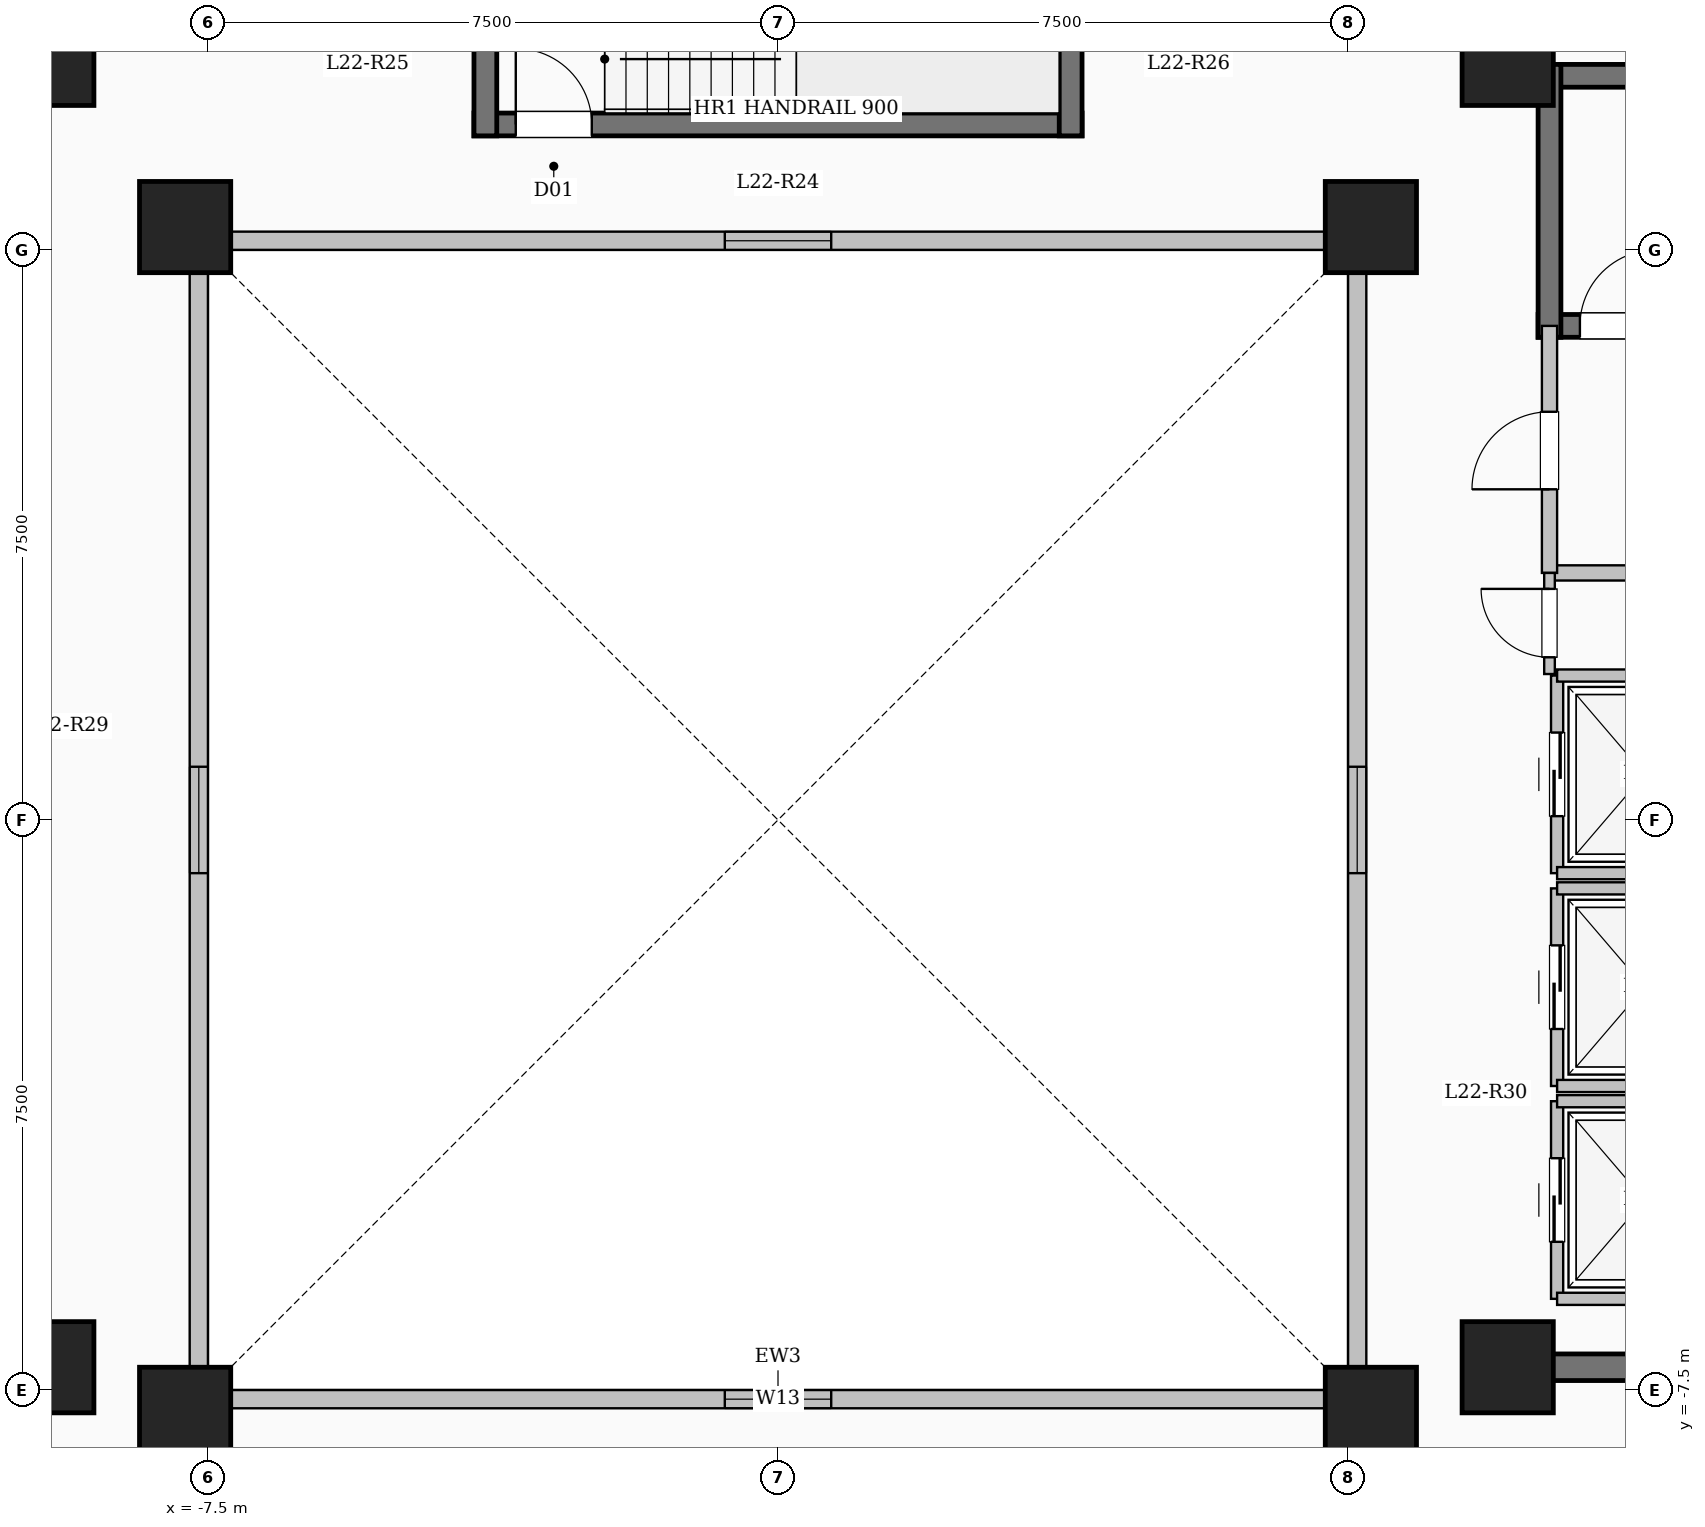
"""IFC4 building model, lengths in metres.
Left out: names, types, materials, properties, quantities, classifications, styles, units other than length and angle.
Written with IfcOpenShell. Run it as: python <this file> out.ifc"""

import sys

from ifc_helpers import new_model, si_unit, direction, frame, frame_2d, origin, origin_2d, place, context, subcontext, project, spatial, rectangle, extrude, element, fill, save


model = new_model("IFC4")
c1 = context("Model", 3, precision=1e-05, world=origin(), true_north=direction((0.0, 1.0)))
c2 = subcontext(c1, "Body", "Model", "MODEL_VIEW")
j1 = project(units=[si_unit("LENGTHUNIT", "METRE"), si_unit("PLANEANGLEUNIT", "RADIAN")], contexts=[c1])
p1 = place(None, origin())
s1 = spatial("IfcSite", under=j1, at=p1, CompositionType="ELEMENT")
p2 = place(p1, origin())
s2 = spatial("IfcBuilding", under=s1, at=p2, CompositionType="ELEMENT")
p3 = place(p2, frame((0.0, 0.0, 85.0)))
s3 = spatial("IfcBuildingStorey", under=s2, at=p3, CompositionType="ELEMENT", Elevation=85.0)
for number, where, z_axis, x_axis in (
    (1, (-7.8, -7.8, 0.0), (0.0, 0.0, 1.0), (1.0, 0.0, 0.0)),
    (2, (7.8, -7.8, 0.0), (0.0, 0.0, 1.0), (1.0, 0.0, 0.0)),
    (3, (-7.8, 7.8, 0.0), (0.0, 0.0, 1.0), (1.0, 0.0, 0.0)),
    (4, (7.8, 7.8, 0.0), (0.0, 0.0, 1.0), (1.0, 0.0, 0.0)),
    (5, (-9.6, -7.2, 0.0), (0.0, 0.0, 1.0), (1.0, 0.0, 0.0)),
    (6, (-9.6, 10.0, 0.0), (0.0, 0.0, 1.0), (1.0, 0.0, 0.0)),
    (7, (9.6, -7.2, 0.0), (0.0, 0.0, 1.0), (1.0, 0.0, 0.0)),
    (8, (9.6, 10.0, 0.0), (0.0, 0.0, 1.0), (1.0, 0.0, 0.0)),
):
    element("IfcColumn", number, at=place(p3, frame(where, z_axis=z_axis, x_axis=x_axis)), inside=s3, PredefinedType="COLUMN", context=c2, shape_type="SweptSolid", body=[
        extrude(rectangle(XDim=1.2, YDim=1.2, at=origin_2d()), origin(), (0.0, 0.0, 1.0), 3.35),
    ])
p4 = place(p3, frame((-7.62, -7.62, 0.0), z_axis=(0.0, 0.0, 1.0), x_axis=(1.0, 0.0, 0.0)))
e9 = element("IfcWall", 9, at=p4, inside=s3, PredefinedType="SOLIDWALL", context=c2, shape_type="SweptSolid", body=[
    extrude(rectangle(XDim=15.24, YDim=0.24, at=frame_2d((7.62, 0.0))), origin(), (0.0, 0.0, 1.0), 3.1),
])
p5 = place(p4, frame((6.92, 0.0, 0.95)))
e10 = element("IfcOpeningElement", 10, at=p5, cuts=e9, PredefinedType="OPENING", context=c2, shape_type="SweptSolid", body=[
    extrude(rectangle(XDim=1.4, YDim=1.5, at=frame_2d((0.7, 0.75))), frame((0.0, 0.13, 0.0), z_axis=(0.0, -1.0, 0.0), x_axis=(1.0, 0.0, 0.0)), (0.0, 0.0, 1.0), 0.26),
])
p6 = place(p3, frame((7.62, -7.62, 0.0), z_axis=(0.0, 0.0, 1.0), x_axis=(0.0, 1.0, 0.0)))
e11 = element("IfcWall", 11, at=p6, inside=s3, PredefinedType="SOLIDWALL", context=c2, shape_type="SweptSolid", body=[
    extrude(rectangle(XDim=15.24, YDim=0.24, at=frame_2d((7.62, 0.0))), origin(), (0.0, 0.0, 1.0), 3.1),
])
p7 = place(p6, frame((6.92, 0.0, 0.95)))
e12 = element("IfcOpeningElement", 12, at=p7, cuts=e11, PredefinedType="OPENING", context=c2, shape_type="SweptSolid", body=[
    extrude(rectangle(XDim=1.4, YDim=1.5, at=frame_2d((0.7, 0.75))), frame((0.0, 0.13, 0.0), z_axis=(0.0, -1.0, 0.0), x_axis=(1.0, 0.0, 0.0)), (0.0, 0.0, 1.0), 0.26),
])
p8 = place(p3, frame((7.62, 7.62, 0.0), z_axis=(0.0, 0.0, 1.0), x_axis=(-1.0, 0.0, 0.0)))
e13 = element("IfcWall", 13, at=p8, inside=s3, PredefinedType="SOLIDWALL", context=c2, shape_type="SweptSolid", body=[
    extrude(rectangle(XDim=15.24, YDim=0.24, at=frame_2d((7.62, 0.0))), origin(), (0.0, 0.0, 1.0), 3.1),
])
p9 = place(p8, frame((6.92, 0.0, 0.95)))
e14 = element("IfcOpeningElement", 14, at=p9, cuts=e13, PredefinedType="OPENING", context=c2, shape_type="SweptSolid", body=[
    extrude(rectangle(XDim=1.4, YDim=1.5, at=frame_2d((0.7, 0.75))), frame((0.0, 0.13, 0.0), z_axis=(0.0, -1.0, 0.0), x_axis=(1.0, 0.0, 0.0)), (0.0, 0.0, 1.0), 0.26),
])
p10 = place(p3, frame((-7.62, 7.62, 0.0), z_axis=(0.0, 0.0, 1.0), x_axis=(0.0, -1.0, 0.0)))
e15 = element("IfcWall", 15, at=p10, inside=s3, PredefinedType="SOLIDWALL", context=c2, shape_type="SweptSolid", body=[
    extrude(rectangle(XDim=15.24, YDim=0.24, at=frame_2d((7.62, 0.0))), origin(), (0.0, 0.0, 1.0), 3.1),
])
p11 = place(p10, frame((6.92, 0.0, 0.95)))
e16 = element("IfcOpeningElement", 16, at=p11, cuts=e15, PredefinedType="OPENING", context=c2, shape_type="SweptSolid", body=[
    extrude(rectangle(XDim=1.4, YDim=1.5, at=frame_2d((0.7, 0.75))), frame((0.0, 0.13, 0.0), z_axis=(0.0, -1.0, 0.0), x_axis=(1.0, 0.0, 0.0)), (0.0, 0.0, 1.0), 0.26),
])
p12 = place(p3, frame((10.0, 9.79, 0.0), z_axis=(0.0, 0.0, 1.0), x_axis=(1.0, 0.0, 0.0)))
e17 = element("IfcWall", 17, at=p12, inside=s3, PredefinedType="SHEAR", context=c2, shape_type="SweptSolid", body=[
    extrude(rectangle(XDim=8.0, YDim=0.3, at=frame_2d((4.0, 0.0))), origin(), (0.0, 0.0, 1.0), 3.35),
])
p13 = place(p3, frame((10.0, 6.5, 0.0), z_axis=(0.0, 0.0, 1.0), x_axis=(1.0, 0.0, 0.0)))
e18 = element("IfcWall", 18, at=p13, inside=s3, PredefinedType="SHEAR", context=c2, shape_type="SweptSolid", body=[
    extrude(rectangle(XDim=8.0, YDim=0.3, at=frame_2d((4.0, 0.0))), origin(), (0.0, 0.0, 1.0), 3.35),
])
p14 = place(p13, frame((0.55, 0.0, 0.0)))
e19 = element("IfcOpeningElement", 19, at=p14, cuts=e18, PredefinedType="OPENING", context=c2, shape_type="SweptSolid", body=[
    extrude(rectangle(XDim=1.0, YDim=2.15, at=frame_2d((0.5, 1.075))), frame((0.0, 0.16, 0.0), z_axis=(0.0, -1.0, 0.0), x_axis=(1.0, 0.0, 0.0)), (0.0, 0.0, 1.0), 0.32),
])
p15 = place(p3, frame((10.15, 6.35, 0.0), z_axis=(0.0, 0.0, 1.0), x_axis=(0.0, 1.0, 0.0)))
e20 = element("IfcWall", 20, at=p15, inside=s3, PredefinedType="SHEAR", context=c2, shape_type="SweptSolid", body=[
    extrude(rectangle(XDim=3.59, YDim=0.3, at=frame_2d((1.795, 0.0))), origin(), (0.0, 0.0, 1.0), 3.35),
])
p16 = place(p3, frame((-4.0, 9.15, 0.0), z_axis=(0.0, 0.0, 1.0), x_axis=(1.0, 0.0, 0.0)))
e21 = element("IfcWall", 21, at=p16, inside=s3, PredefinedType="SHEAR", context=c2, shape_type="SweptSolid", body=[
    extrude(rectangle(XDim=8.0, YDim=0.3, at=frame_2d((4.0, 0.0))), origin(), (0.0, 0.0, 1.0), 3.35),
])
p17 = place(p16, frame((0.55, 0.0, 0.0)))
e22 = element("IfcOpeningElement", 22, at=p17, cuts=e21, PredefinedType="OPENING", context=c2, shape_type="SweptSolid", body=[
    extrude(rectangle(XDim=1.0, YDim=2.15, at=frame_2d((0.5, 1.075))), frame((0.0, 0.16, 0.0), z_axis=(0.0, -1.0, 0.0), x_axis=(1.0, 0.0, 0.0)), (0.0, 0.0, 1.0), 0.32),
])
for number, where, z_axis, x_axis in (
    (23, (-3.85, 9.0, 0.0), (0.0, 0.0, 1.0), (0.0, 1.0, 0.0)),
    (24, (3.85, 9.0, 0.0), (0.0, 0.0, 1.0), (0.0, 1.0, 0.0)),
):
    element("IfcWall", number, at=place(p3, frame(where, z_axis=z_axis, x_axis=x_axis)), inside=s3, PredefinedType="SHEAR", context=c2, shape_type="SweptSolid", body=[
        extrude(rectangle(XDim=3.59, YDim=0.3, at=frame_2d((1.795, 0.0))), origin(), (0.0, 0.0, 1.0), 3.35),
    ])
p18 = place(p3, frame((10.15, 3.25, 0.0), z_axis=(0.0, 0.0, 1.0), x_axis=(1.0, 0.0, 0.0)))
e25 = element("IfcWall", 25, at=p18, inside=s3, PredefinedType="SOLIDWALL", context=c2, shape_type="SweptSolid", body=[
    extrude(rectangle(XDim=5.4, YDim=0.2, at=frame_2d((2.7, 0.0))), origin(), (0.0, 0.0, 1.0), 3.1),
])
p19 = place(p3, frame((10.15, 3.25, 0.0), z_axis=(0.0, 0.0, 1.0), x_axis=(0.0, 1.0, 0.0)))
e26 = element("IfcWall", 26, at=p19, inside=s3, PredefinedType="SOLIDWALL", context=c2, shape_type="SweptSolid", body=[
    extrude(rectangle(XDim=3.25, YDim=0.2, at=frame_2d((1.625, 0.0))), origin(), (0.0, 0.0, 1.0), 3.1),
])
p20 = place(p19, frame((1.1, 0.0, 0.0)))
e27 = element("IfcOpeningElement", 27, at=p20, cuts=e26, PredefinedType="OPENING", context=c2, shape_type="SweptSolid", body=[
    extrude(rectangle(XDim=1.02, YDim=2.15, at=frame_2d((0.51, 1.075))), frame((0.0, 0.11, 0.0), z_axis=(0.0, -1.0, 0.0), x_axis=(1.0, 0.0, 0.0)), (0.0, 0.0, 1.0), 0.22),
])
p21 = place(p3, frame((10.25, -6.3, 0.0), z_axis=(0.0, 0.0, 1.0), x_axis=(0.0, 1.0, 0.0)))
e28 = element("IfcWall", 28, at=p21, inside=s3, PredefinedType="SOLIDWALL", context=c2, shape_type="SweptSolid", body=[
    extrude(rectangle(XDim=2.6, YDim=0.16, at=frame_2d((1.3, 0.0))), origin(), (0.0, 0.0, 1.0), 3.1),
])
p22 = place(p21, frame((0.75, 0.0, 0.0)))
e29 = element("IfcOpeningElement", 29, at=p22, cuts=e28, PredefinedType="OPENING", context=c2, shape_type="SweptSolid", body=[
    extrude(rectangle(XDim=1.1, YDim=2.15, at=frame_2d((0.55, 1.075))), frame((0.0, 0.09, 0.0), z_axis=(0.0, -1.0, 0.0), x_axis=(1.0, 0.0, 0.0)), (0.0, 0.0, 1.0), 0.18),
])
for number, where, z_axis, x_axis in (
    (30, (10.25, -6.3, 0.0), (0.0, 0.0, 1.0), (1.0, 0.0, 0.0)),
    (31, (10.25, -3.7, 0.0), (0.0, 0.0, 1.0), (1.0, 0.0, 0.0)),
):
    element("IfcWall", number, at=place(p3, frame(where, z_axis=z_axis, x_axis=x_axis)), inside=s3, PredefinedType="SOLIDWALL", context=c2, shape_type="SweptSolid", body=[
        extrude(rectangle(XDim=2.3, YDim=0.16, at=frame_2d((1.15, 0.0))), origin(), (0.0, 0.0, 1.0), 3.1),
    ])
p23 = place(p3, frame((10.25, -3.5, 0.0), z_axis=(0.0, 0.0, 1.0), x_axis=(0.0, 1.0, 0.0)))
e32 = element("IfcWall", 32, at=p23, inside=s3, PredefinedType="SOLIDWALL", context=c2, shape_type="SweptSolid", body=[
    extrude(rectangle(XDim=2.6, YDim=0.16, at=frame_2d((1.3, 0.0))), origin(), (0.0, 0.0, 1.0), 3.1),
])
p24 = place(p23, frame((0.75, 0.0, 0.0)))
e33 = element("IfcOpeningElement", 33, at=p24, cuts=e32, PredefinedType="OPENING", context=c2, shape_type="SweptSolid", body=[
    extrude(rectangle(XDim=1.1, YDim=2.15, at=frame_2d((0.55, 1.075))), frame((0.0, 0.09, 0.0), z_axis=(0.0, -1.0, 0.0), x_axis=(1.0, 0.0, 0.0)), (0.0, 0.0, 1.0), 0.18),
])
for number, where, z_axis, x_axis in (
    (34, (10.25, -3.5, 0.0), (0.0, 0.0, 1.0), (1.0, 0.0, 0.0)),
    (35, (10.25, -0.9, 0.0), (0.0, 0.0, 1.0), (1.0, 0.0, 0.0)),
):
    element("IfcWall", number, at=place(p3, frame(where, z_axis=z_axis, x_axis=x_axis)), inside=s3, PredefinedType="SOLIDWALL", context=c2, shape_type="SweptSolid", body=[
        extrude(rectangle(XDim=2.3, YDim=0.16, at=frame_2d((1.15, 0.0))), origin(), (0.0, 0.0, 1.0), 3.1),
    ])
p25 = place(p3, frame((10.25, -0.7, 0.0), z_axis=(0.0, 0.0, 1.0), x_axis=(0.0, 1.0, 0.0)))
e36 = element("IfcWall", 36, at=p25, inside=s3, PredefinedType="SOLIDWALL", context=c2, shape_type="SweptSolid", body=[
    extrude(rectangle(XDim=2.6, YDim=0.16, at=frame_2d((1.3, 0.0))), origin(), (0.0, 0.0, 1.0), 3.1),
])
p26 = place(p25, frame((0.75, 0.0, 0.0)))
e37 = element("IfcOpeningElement", 37, at=p26, cuts=e36, PredefinedType="OPENING", context=c2, shape_type="SweptSolid", body=[
    extrude(rectangle(XDim=1.1, YDim=2.15, at=frame_2d((0.55, 1.075))), frame((0.0, 0.09, 0.0), z_axis=(0.0, -1.0, 0.0), x_axis=(1.0, 0.0, 0.0)), (0.0, 0.0, 1.0), 0.18),
])
for number, where, z_axis, x_axis in (
    (38, (10.25, -0.7, 0.0), (0.0, 0.0, 1.0), (1.0, 0.0, 0.0)),
    (39, (10.25, 1.9, 0.0), (0.0, 0.0, 1.0), (1.0, 0.0, 0.0)),
):
    element("IfcWall", number, at=place(p3, frame(where, z_axis=z_axis, x_axis=x_axis)), inside=s3, PredefinedType="SOLIDWALL", context=c2, shape_type="SweptSolid", body=[
        extrude(rectangle(XDim=2.3, YDim=0.16, at=frame_2d((1.15, 0.0))), origin(), (0.0, 0.0, 1.0), 3.1),
    ])
p27 = place(p3, frame((10.075, -7.2, 0.0), z_axis=(0.0, 0.0, 1.0), x_axis=(1.0, 0.0, 0.0)))
e40 = element("IfcWall", 40, at=p27, inside=s3, PredefinedType="SHEAR", context=c2, shape_type="SweptSolid", body=[
    extrude(rectangle(XDim=8.55, YDim=0.35, at=frame_2d((4.275, 0.0))), origin(), (0.0, 0.0, 1.0), 3.35),
])
p28 = place(p3, frame((10.15, 1.92, 0.0), z_axis=(0.0, 0.0, 1.0), x_axis=(0.0, 1.0, 0.0)))
e41 = element("IfcWall", 41, at=p28, inside=s3, PredefinedType="PARTITIONING", context=c2, shape_type="SweptSolid", body=[
    extrude(rectangle(XDim=1.33, YDim=0.14, at=frame_2d((0.665, 0.0))), origin(), (0.0, 0.0, 1.0), 3.1),
])
p29 = place(p28, frame((0.22, 0.0, 0.0)))
e42 = element("IfcOpeningElement", 42, at=p29, cuts=e41, PredefinedType="OPENING", context=c2, shape_type="SweptSolid", body=[
    extrude(rectangle(XDim=0.9, YDim=2.08, at=frame_2d((0.45, 1.04))), frame((0.0, 0.08, 0.0), z_axis=(0.0, -1.0, 0.0), x_axis=(1.0, 0.0, 0.0)), (0.0, 0.0, 1.0), 0.16),
])
p30 = place(p5, origin())
e43 = element("IfcWindow", 43, at=p30, inside=s3, PartitioningType="SINGLE_PANEL", PredefinedType="WINDOW", context=c2, shape_type="SweptSolid", body=[
    extrude(rectangle(XDim=1.4, YDim=1.5, at=frame_2d((0.7, 0.75))), frame((0.0, 0.03, 0.0), z_axis=(0.0, -1.0, 0.0), x_axis=(1.0, 0.0, 0.0)), (0.0, 0.0, 1.0), 0.06),
])
fill(e10, e43)
p31 = place(p7, origin())
e44 = element("IfcWindow", 44, at=p31, inside=s3, PartitioningType="SINGLE_PANEL", PredefinedType="WINDOW", context=c2, shape_type="SweptSolid", body=[
    extrude(rectangle(XDim=1.4, YDim=1.5, at=frame_2d((0.7, 0.75))), frame((0.0, 0.03, 0.0), z_axis=(0.0, -1.0, 0.0), x_axis=(1.0, 0.0, 0.0)), (0.0, 0.0, 1.0), 0.06),
])
fill(e12, e44)
p32 = place(p9, origin())
e45 = element("IfcWindow", 45, at=p32, inside=s3, PartitioningType="SINGLE_PANEL", PredefinedType="WINDOW", context=c2, shape_type="SweptSolid", body=[
    extrude(rectangle(XDim=1.4, YDim=1.5, at=frame_2d((0.7, 0.75))), frame((0.0, 0.03, 0.0), z_axis=(0.0, -1.0, 0.0), x_axis=(1.0, 0.0, 0.0)), (0.0, 0.0, 1.0), 0.06),
])
fill(e14, e45)
p33 = place(p11, origin())
e46 = element("IfcWindow", 46, at=p33, inside=s3, PartitioningType="SINGLE_PANEL", PredefinedType="WINDOW", context=c2, shape_type="SweptSolid", body=[
    extrude(rectangle(XDim=1.4, YDim=1.5, at=frame_2d((0.7, 0.75))), frame((0.0, 0.03, 0.0), z_axis=(0.0, -1.0, 0.0), x_axis=(1.0, 0.0, 0.0)), (0.0, 0.0, 1.0), 0.06),
])
fill(e16, e46)
p34 = place(p14, origin())
e47 = element("IfcDoor", 47, at=p34, inside=s3, OperationType="SINGLE_SWING_RIGHT", PredefinedType="DOOR", context=c2, shape_type="SweptSolid", body=[
    extrude(rectangle(XDim=1.0, YDim=2.15, at=frame_2d((0.5, 1.075))), frame((0.0, 0.025, 0.0), z_axis=(0.0, -1.0, 0.0), x_axis=(1.0, 0.0, 0.0)), (0.0, 0.0, 1.0), 0.05),
])
fill(e19, e47)
p35 = place(p17, origin())
e48 = element("IfcDoor", 48, at=p35, inside=s3, OperationType="SINGLE_SWING_LEFT", PredefinedType="DOOR", context=c2, shape_type="SweptSolid", body=[
    extrude(rectangle(XDim=1.0, YDim=2.15, at=frame_2d((0.5, 1.075))), frame((0.0, 0.025, 0.0), z_axis=(0.0, -1.0, 0.0), x_axis=(1.0, 0.0, 0.0)), (0.0, 0.0, 1.0), 0.05),
])
fill(e22, e48)
p36 = place(p20, origin())
e49 = element("IfcDoor", 49, at=p36, inside=s3, OperationType="SINGLE_SWING_LEFT", PredefinedType="DOOR", context=c2, shape_type="SweptSolid", body=[
    extrude(rectangle(XDim=1.02, YDim=2.15, at=frame_2d((0.51, 1.075))), frame((0.0, 0.025, 0.0), z_axis=(0.0, -1.0, 0.0), x_axis=(1.0, 0.0, 0.0)), (0.0, 0.0, 1.0), 0.05),
])
fill(e27, e49)
p37 = place(p22, origin())
e50 = element("IfcDoor", 50, at=p37, inside=s3, OperationType="SLIDING_TO_LEFT", PredefinedType="DOOR", context=c2, shape_type="SweptSolid", body=[
    extrude(rectangle(XDim=1.1, YDim=2.15, at=frame_2d((0.55, 1.075))), frame((0.0, 0.025, 0.0), z_axis=(0.0, -1.0, 0.0), x_axis=(1.0, 0.0, 0.0)), (0.0, 0.0, 1.0), 0.05),
])
fill(e29, e50)
p38 = place(p24, origin())
e51 = element("IfcDoor", 51, at=p38, inside=s3, OperationType="SLIDING_TO_LEFT", PredefinedType="DOOR", context=c2, shape_type="SweptSolid", body=[
    extrude(rectangle(XDim=1.1, YDim=2.15, at=frame_2d((0.55, 1.075))), frame((0.0, 0.025, 0.0), z_axis=(0.0, -1.0, 0.0), x_axis=(1.0, 0.0, 0.0)), (0.0, 0.0, 1.0), 0.05),
])
fill(e33, e51)
p39 = place(p26, origin())
e52 = element("IfcDoor", 52, at=p39, inside=s3, OperationType="SLIDING_TO_LEFT", PredefinedType="DOOR", context=c2, shape_type="SweptSolid", body=[
    extrude(rectangle(XDim=1.1, YDim=2.15, at=frame_2d((0.55, 1.075))), frame((0.0, 0.025, 0.0), z_axis=(0.0, -1.0, 0.0), x_axis=(1.0, 0.0, 0.0)), (0.0, 0.0, 1.0), 0.05),
])
fill(e37, e52)
p40 = place(p29, origin())
e53 = element("IfcDoor", 53, at=p40, inside=s3, OperationType="SINGLE_SWING_RIGHT", PredefinedType="DOOR", context=c2, shape_type="SweptSolid", body=[
    extrude(rectangle(XDim=0.9, YDim=2.08, at=frame_2d((0.45, 1.04))), frame((0.0, 0.025, 0.0), z_axis=(0.0, -1.0, 0.0), x_axis=(1.0, 0.0, 0.0)), (0.0, 0.0, 1.0), 0.05),
])
fill(e42, e53)
save(model, sys.argv[1])
